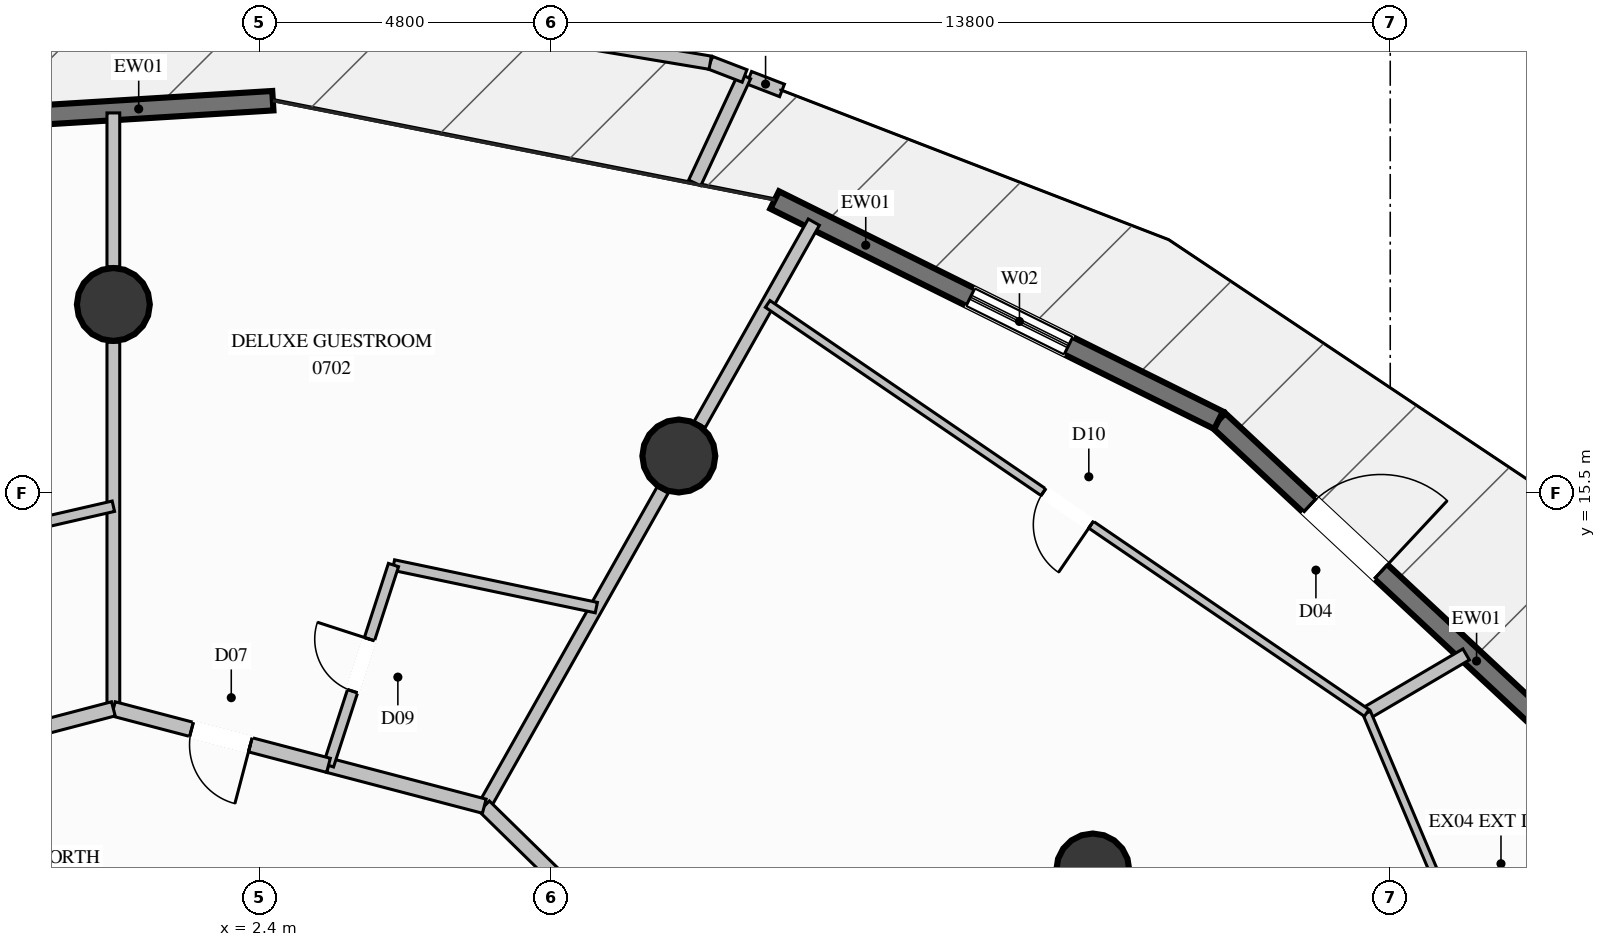
"""IFC4 building model, lengths in metres.
Left out: names, types, materials, properties, quantities, classifications, styles, units other than length and angle.
Written with IfcOpenShell. Run it as: python <this file> out.ifc"""

import sys

from ifc_helpers import new_model, si_unit, direction, frame, frame_2d, origin, origin_2d, place, context, subcontext, project, spatial, rectangle, circle, extrude, element, fill, save


model = new_model("IFC4")
c1 = context("Model", 3, precision=1e-05, world=origin(), true_north=direction((0.0, 1.0)))
c2 = subcontext(c1, "Body", "Model", "MODEL_VIEW")
j1 = project(units=[si_unit("LENGTHUNIT", "METRE"), si_unit("PLANEANGLEUNIT", "RADIAN")], contexts=[c1])
p1 = place(None, origin())
s1 = spatial("IfcSite", under=j1, at=p1, CompositionType="ELEMENT")
p2 = place(p1, origin())
s2 = spatial("IfcBuilding", under=s1, at=p2, CompositionType="ELEMENT")
p3 = place(p2, frame((0.0, 0.0, 28.4)))
s3 = spatial("IfcBuildingStorey", under=s2, at=p3, CompositionType="ELEMENT", Elevation=28.4)
for number, where, z_axis, x_axis in (
    (1, (16.108, 9.3, 0.0), (0.0, 0.0, 1.0), (1.0, 0.0, 0.0)),
    (2, (9.3, 16.108, 0.0), (0.0, 0.0, 1.0), (1.0, 0.0, 0.0)),
    (3, (0.0, 18.6, 0.0), (0.0, 0.0, 1.0), (1.0, 0.0, 0.0)),
):
    element("IfcColumn", number, at=place(p3, frame(where, z_axis=z_axis, x_axis=x_axis)), inside=s3, PredefinedType="COLUMN", context=c2, shape_type="SweptSolid", body=[
        extrude(circle(Radius=0.6, at=origin_2d()), origin(), (0.0, 0.0, 1.0), 3.6),
    ])
p4 = place(p3, frame((18.177, 16.696, 0.0), z_axis=(0.0, 0.0, 1.0), x_axis=(0.731083716984, -0.682287768292, 0.0)))
e4 = element("IfcWall", 4, at=p4, inside=s3, PredefinedType="SOLIDWALL", context=c2, shape_type="SweptSolid", body=[
    extrude(rectangle(XDim=7.705, YDim=0.32, at=frame_2d((3.853, 0.0))), origin(), (0.0, 0.0, 1.0), 3.34),
])
p5 = place(p4, frame((2.052, 0.0, 0.0)))
e5 = element("IfcOpeningElement", 5, at=p5, cuts=e4, PredefinedType="OPENING", context=c2, shape_type="SweptSolid", body=[
    extrude(rectangle(XDim=1.6, YDim=2.3, at=frame_2d((0.8, 1.15))), frame((0.0, 0.17, 0.0), z_axis=(0.0, -1.0, 0.0), x_axis=(1.0, 0.0, 0.0)), (0.0, 0.0, 1.0), 0.34),
])
p6 = place(p3, frame((10.876, 20.318, 0.0), z_axis=(0.0, 0.0, 1.0), x_axis=(0.895818759339, -0.444419565743, 0.0)))
e6 = element("IfcWall", 6, at=p6, inside=s3, PredefinedType="SOLIDWALL", context=c2, shape_type="SweptSolid", body=[
    extrude(rectangle(XDim=8.15, YDim=0.32, at=frame_2d((4.075, 0.0))), origin(), (0.0, 0.0, 1.0), 3.34),
])
p7 = place(p6, frame((3.594, 0.0, 0.35)))
e7 = element("IfcOpeningElement", 7, at=p7, cuts=e6, PredefinedType="OPENING", context=c2, shape_type="SweptSolid", body=[
    extrude(rectangle(XDim=1.8, YDim=2.6, at=frame_2d((0.9, 1.3))), frame((0.0, 0.17, 0.0), z_axis=(0.0, -1.0, 0.0), x_axis=(1.0, 0.0, 0.0)), (0.0, 0.0, 1.0), 0.34),
])
p8 = place(p3, frame((-5.773, 21.435, 0.0), z_axis=(0.0, 0.0, 1.0), x_axis=(0.998117750792, 0.06132663005, 0.0)))
e8 = element("IfcWall", 8, at=p8, inside=s3, PredefinedType="SOLIDWALL", context=c2, shape_type="SweptSolid", body=[
    extrude(rectangle(XDim=8.412, YDim=0.32, at=frame_2d((4.206, 0.0))), origin(), (0.0, 0.0, 1.0), 3.34),
])
p9 = place(p8, frame((1.941, 0.0, 0.35)))
e9 = element("IfcOpeningElement", 9, at=p9, cuts=e8, PredefinedType="OPENING", context=c2, shape_type="SweptSolid", body=[
    extrude(rectangle(XDim=1.8, YDim=2.6, at=frame_2d((0.9, 1.3))), frame((0.0, 0.17, 0.0), z_axis=(0.0, -1.0, 0.0), x_axis=(1.0, 0.0, 0.0)), (0.0, 0.0, 1.0), 0.34),
])
p10 = place(p3, frame((10.997, 22.12, 0.0), z_axis=(0.0, 0.0, 1.0), x_axis=(-0.932823861969, 0.360332683143, 0.0)))
e10 = element("IfcWall", 10, at=p10, inside=s3, PredefinedType="PARAPET", context=c2, shape_type="SweptSolid", body=[
    extrude(rectangle(XDim=0.58, YDim=0.22, at=frame_2d((0.29, 0.0))), origin(), (0.0, 0.0, 1.0), 1.15),
])
p11 = place(p3, frame((9.561, 20.599, 0.0), z_axis=(0.0, 0.0, 1.0), x_axis=(0.422589288727, 0.906321296811, 0.0)))
e11 = element("IfcWall", 11, at=p11, inside=s3, PredefinedType="PARAPET", context=c2, shape_type="SweptSolid", body=[
    extrude(rectangle(XDim=1.941, YDim=0.22, at=frame_2d((0.97, 0.0))), origin(), (0.0, 0.0, 1.0), 1.15),
])
p12 = place(p3, frame((10.381, 22.358, 0.0), z_axis=(0.0, 0.0, 1.0), x_axis=(-0.932991992414, 0.359897127095, 0.0)))
e12 = element("IfcWall", 12, at=p12, inside=s3, PredefinedType="PARAPET", context=c2, shape_type="SweptSolid", body=[
    extrude(rectangle(XDim=0.606, YDim=0.22, at=frame_2d((0.303, 0.0))), origin(), (0.0, 0.0, 1.0), 1.15),
])
p13 = place(p3, frame((9.816, 22.576, 0.0), z_axis=(0.0, 0.0, 1.0), x_axis=(-0.98635584135, 0.164627319226, 0.0)))
e13 = element("IfcWall", 13, at=p13, inside=s3, PredefinedType="PARAPET", context=c2, shape_type="SweptSolid", body=[
    extrude(rectangle(XDim=8.323, YDim=0.22, at=frame_2d((4.161, 0.0))), origin(), (0.0, 0.0, 1.0), 1.15),
])
p14 = place(p3, frame((6.1, 10.349, 0.0), z_axis=(0.0, 0.0, 1.0), x_axis=(0.491458802648, 0.870900824032, 0.0)))
e14 = element("IfcWall", 14, at=p14, inside=s3, PredefinedType="PARTITIONING", context=c2, shape_type="SweptSolid", body=[
    extrude(rectangle(XDim=5.97, YDim=0.21, at=frame_2d((2.985, 0.0))), origin(), (0.0, 0.0, 1.0), 2.708),
])
p15 = place(p3, frame((9.642, 16.625, 0.0), z_axis=(0.0, 0.0, 1.0), x_axis=(0.491316217202, 0.870981271161, 0.0)))
e15 = element("IfcWall", 15, at=p15, inside=s3, PredefinedType="PARTITIONING", context=c2, shape_type="SweptSolid", body=[
    extrude(rectangle(XDim=3.822, YDim=0.21, at=frame_2d((1.911, 0.0))), origin(), (0.0, 0.0, 1.0), 3.34),
])
p16 = place(p3, frame((0.0, 11.95, 0.0), z_axis=(0.0, 0.0, 1.0), x_axis=(0.0, 1.0, 0.0)))
e16 = element("IfcWall", 16, at=p16, inside=s3, PredefinedType="PARTITIONING", context=c2, shape_type="SweptSolid", body=[
    extrude(rectangle(XDim=6.03, YDim=0.21, at=frame_2d((3.015, 0.0))), origin(), (0.0, 0.0, 1.0), 2.708),
])
p17 = place(p3, frame((0.0, 19.22, 0.0), z_axis=(0.0, 0.0, 1.0), x_axis=(0.0, 1.0, 0.0)))
e17 = element("IfcWall", 17, at=p17, inside=s3, PredefinedType="PARTITIONING", context=c2, shape_type="SweptSolid", body=[
    extrude(rectangle(XDim=2.53, YDim=0.21, at=frame_2d((1.265, 0.0))), origin(), (0.0, 0.0, 1.0), 3.34),
])
p18 = place(p3, frame((20.613, 11.883, 0.0), z_axis=(0.0, 0.0, 1.0), x_axis=(0.861901128596, 0.507076369519, 0.0)))
e18 = element("IfcWall", 18, at=p18, inside=s3, PredefinedType="PARTITIONING", context=c2, shape_type="SweptSolid", body=[
    extrude(rectangle(XDim=1.897, YDim=0.21, at=frame_2d((0.948, 0.0))), origin(), (0.0, 0.0, 1.0), 3.34),
])
p19 = place(p3, frame((10.566, 5.975, 0.0), z_axis=(0.0, 0.0, 1.0), x_axis=(-0.714411174131, 0.699726142342, 0.0)))
e19 = element("IfcWall", 19, at=p19, inside=s3, PredefinedType="PARTITIONING", context=c2, shape_type="SweptSolid", body=[
    extrude(rectangle(XDim=6.251, YDim=0.24, at=frame_2d((3.125, 0.0))), origin(), (0.0, 0.0, 1.0), 3.34),
])
p20 = place(p3, frame((25.635, 0.0, 0.0), z_axis=(0.0, 0.0, 1.0), x_axis=(-0.389280036571, 0.921119456491, 0.0)))
e20 = element("IfcWall", 20, at=p20, inside=s3, PredefinedType="PARTITIONING", context=c2, shape_type="SweptSolid", body=[
    extrude(rectangle(XDim=12.901, YDim=0.135, at=frame_2d((6.45, 0.0))), origin(), (0.0, 0.0, 1.0), 3.34),
])
p21 = place(p20, frame((5.975, 0.0, 0.0)))
e21 = element("IfcOpeningElement", 21, at=p21, cuts=e20, PredefinedType="OPENING", context=c2, shape_type="SweptSolid", body=[
    extrude(rectangle(XDim=0.95, YDim=2.1, at=frame_2d((0.475, 1.05))), frame((0.0, 0.078, 0.0), z_axis=(0.0, -1.0, 0.0), x_axis=(1.0, 0.0, 0.0)), (0.0, 0.0, 1.0), 0.155),
])
p22 = place(p3, frame((20.613, 11.883, 0.0), z_axis=(0.0, 0.0, 1.0), x_axis=(-0.825894658533, 0.563824452295, 0.0)))
e22 = element("IfcWall", 22, at=p22, inside=s3, PredefinedType="PARTITIONING", context=c2, shape_type="SweptSolid", body=[
    extrude(rectangle(XDim=11.929, YDim=0.135, at=frame_2d((5.964, 0.0))), origin(), (0.0, 0.0, 1.0), 3.34),
])
p23 = place(p22, frame((5.489, 0.0, 0.0)))
e23 = element("IfcOpeningElement", 23, at=p23, cuts=e22, PredefinedType="OPENING", context=c2, shape_type="SweptSolid", body=[
    extrude(rectangle(XDim=0.95, YDim=2.1, at=frame_2d((0.475, 1.05))), frame((0.0, 0.078, 0.0), z_axis=(0.0, -1.0, 0.0), x_axis=(1.0, 0.0, 0.0)), (0.0, 0.0, 1.0), 0.155),
])
p24 = place(p3, frame((6.1, 10.349, 0.0), z_axis=(0.0, 0.0, 1.0), x_axis=(-0.967291490053, 0.253667446219, 0.0)))
e24 = element("IfcWall", 24, at=p24, inside=s3, PredefinedType="PARTITIONING", context=c2, shape_type="SweptSolid", body=[
    extrude(rectangle(XDim=2.649, YDim=0.24, at=frame_2d((1.324, 0.0))), origin(), (0.0, 0.0, 1.0), 3.34),
])
p25 = place(p3, frame((7.943, 13.615, 0.0), z_axis=(0.0, 0.0, 1.0), x_axis=(-0.978691652986, 0.205335453283, 0.0)))
e25 = element("IfcWall", 25, at=p25, inside=s3, PredefinedType="PLUMBINGWALL", context=c2, shape_type="SweptSolid", body=[
    extrude(rectangle(XDim=3.409, YDim=0.175, at=frame_2d((1.705, 0.0))), origin(), (0.0, 0.0, 1.0), 3.34),
])
p26 = place(p3, frame((3.538, 11.021, 0.0), z_axis=(0.0, 0.0, 1.0), x_axis=(0.308646066056, 0.951176958251, 0.0)))
e26 = element("IfcWall", 26, at=p26, inside=s3, PredefinedType="PLUMBINGWALL", context=c2, shape_type="SweptSolid", body=[
    extrude(rectangle(XDim=3.463, YDim=0.175, at=frame_2d((1.731, 0.0))), origin(), (0.0, 0.0, 1.0), 3.34),
])
p27 = place(p26, frame((1.282, 0.0, 0.0)))
e27 = element("IfcOpeningElement", 27, at=p27, cuts=e26, PredefinedType="OPENING", context=c2, shape_type="SweptSolid", body=[
    extrude(rectangle(XDim=0.9, YDim=2.1, at=frame_2d((0.45, 1.05))), frame((0.0, 0.098, 0.0), z_axis=(0.0, -1.0, 0.0), x_axis=(1.0, 0.0, 0.0)), (0.0, 0.0, 1.0), 0.195),
])
p28 = place(p3, frame((3.538, 11.021, 0.0), z_axis=(0.0, 0.0, 1.0), x_axis=(-0.96721703222, 0.253951201187, 0.0)))
e28 = element("IfcWall", 28, at=p28, inside=s3, PredefinedType="PARTITIONING", context=c2, shape_type="SweptSolid", body=[
    extrude(rectangle(XDim=3.658, YDim=0.24, at=frame_2d((1.829, 0.0))), origin(), (0.0, 0.0, 1.0), 2.919),
])
p29 = place(p28, frame((1.329, 0.0, 0.0)))
e29 = element("IfcOpeningElement", 29, at=p29, cuts=e28, PredefinedType="OPENING", context=c2, shape_type="SweptSolid", body=[
    extrude(rectangle(XDim=1.0, YDim=2.2, at=frame_2d((0.5, 1.1))), frame((0.0, 0.13, 0.0), z_axis=(0.0, -1.0, 0.0), x_axis=(1.0, 0.0, 0.0)), (0.0, 0.0, 1.0), 0.26),
])
p30 = place(p3, frame((0.0, 11.95, 0.0), z_axis=(0.0, 0.0, 1.0), x_axis=(-0.967291490053, -0.253667446219, 0.0)))
e30 = element("IfcWall", 30, at=p30, inside=s3, PredefinedType="PARTITIONING", context=c2, shape_type="SweptSolid", body=[
    extrude(rectangle(XDim=2.649, YDim=0.24, at=frame_2d((1.324, 0.0))), origin(), (0.0, 0.0, 1.0), 2.919),
])
p31 = place(p3, frame((0.0, 15.282, 0.0), z_axis=(0.0, 0.0, 1.0), x_axis=(-0.974505253862, -0.224364681257, 0.0)))
e31 = element("IfcWall", 31, at=p31, inside=s3, PredefinedType="PLUMBINGWALL", context=c2, shape_type="SweptSolid", body=[
    extrude(rectangle(XDim=3.387, YDim=0.175, at=frame_2d((1.694, 0.0))), origin(), (0.0, 0.0, 1.0), 3.34),
])
p32 = place(p5, origin())
e32 = element("IfcDoor", 32, at=p32, inside=s3, OperationType="SINGLE_SWING_RIGHT", PredefinedType="DOOR", context=c2, shape_type="SweptSolid", body=[
    extrude(rectangle(XDim=1.6, YDim=2.3, at=frame_2d((0.8, 1.15))), frame((0.0, 0.025, 0.0), z_axis=(0.0, -1.0, 0.0), x_axis=(1.0, 0.0, 0.0)), (0.0, 0.0, 1.0), 0.05),
])
fill(e5, e32)
p33 = place(p7, origin())
e33 = element("IfcWindow", 33, at=p33, inside=s3, PartitioningType="SINGLE_PANEL", PredefinedType="WINDOW", context=c2, shape_type="SweptSolid", body=[
    extrude(rectangle(XDim=1.8, YDim=2.6, at=frame_2d((0.9, 1.3))), frame((0.0, 0.03, 0.0), z_axis=(0.0, -1.0, 0.0), x_axis=(1.0, 0.0, 0.0)), (0.0, 0.0, 1.0), 0.06),
])
fill(e7, e33)
p34 = place(p23, origin())
e34 = element("IfcDoor", 34, at=p34, inside=s3, OperationType="SINGLE_SWING_LEFT", PredefinedType="DOOR", context=c2, shape_type="SweptSolid", body=[
    extrude(rectangle(XDim=0.95, YDim=2.1, at=frame_2d((0.475, 1.05))), frame((0.0, 0.025, 0.0), z_axis=(0.0, -1.0, 0.0), x_axis=(1.0, 0.0, 0.0)), (0.0, 0.0, 1.0), 0.05),
])
fill(e23, e34)
p35 = place(p27, origin())
e35 = element("IfcDoor", 35, at=p35, inside=s3, OperationType="SINGLE_SWING_RIGHT", PredefinedType="DOOR", context=c2, shape_type="SweptSolid", body=[
    extrude(rectangle(XDim=0.9, YDim=2.1, at=frame_2d((0.45, 1.05))), frame((0.0, 0.025, 0.0), z_axis=(0.0, -1.0, 0.0), x_axis=(1.0, 0.0, 0.0)), (0.0, 0.0, 1.0), 0.05),
])
fill(e27, e35)
p36 = place(p29, origin())
e36 = element("IfcDoor", 36, at=p36, inside=s3, OperationType="SINGLE_SWING_LEFT", PredefinedType="DOOR", context=c2, shape_type="SweptSolid", body=[
    extrude(rectangle(XDim=1.0, YDim=2.2, at=frame_2d((0.5, 1.1))), frame((0.0, 0.025, 0.0), z_axis=(0.0, -1.0, 0.0), x_axis=(1.0, 0.0, 0.0)), (0.0, 0.0, 1.0), 0.05),
])
fill(e29, e36)
save(model, sys.argv[1])
